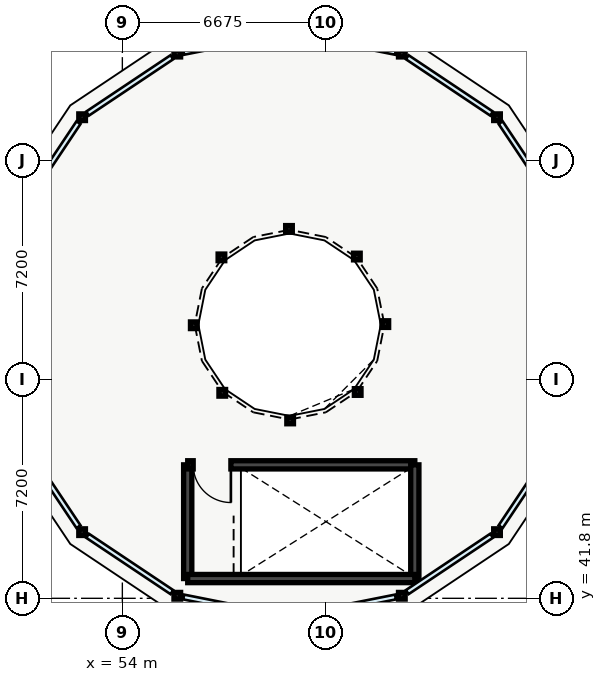
"""IFC4 building model, lengths in metres.
Left out: names, types, materials, properties, quantities, classifications, styles, units other than length and angle.
Written with IfcOpenShell. Run it as: python <this file> out.ifc"""

import sys

from ifc_helpers import new_model, si_unit, direction, frame, frame_2d, origin, origin_2d, place, context, subcontext, project, spatial, rectangle, hollow_circle, extrude, element, fill, save


model = new_model("IFC4")
c1 = context("Model", 3, precision=1e-05, world=origin(), true_north=direction((0.0, 1.0)))
c2 = subcontext(c1, "Body", "Model", "MODEL_VIEW")
j1 = project(units=[si_unit("LENGTHUNIT", "METRE"), si_unit("PLANEANGLEUNIT", "RADIAN")], contexts=[c1])
p1 = place(None, origin())
s1 = spatial("IfcSite", under=j1, at=p1, CompositionType="ELEMENT")
p2 = place(p1, origin())
s2 = spatial("IfcBuilding", under=s1, at=p2, CompositionType="ELEMENT")
p3 = place(p2, frame((0.0, 0.0, 5.1)))
s3 = spatial("IfcBuildingStorey", under=s2, at=p3, CompositionType="ELEMENT", Elevation=5.1)
for number, where, z_axis, x_axis in (
    (1, (66.323, 57.624, 0.0), (0.0, 0.0, 1.0), (1.0, 0.0, 0.0)),
    (2, (63.193, 59.715, 0.0), (0.0, 0.0, 1.0), (1.0, 0.0, 0.0)),
    (3, (55.807, 59.715, 0.0), (0.0, 0.0, 1.0), (1.0, 0.0, 0.0)),
    (4, (52.677, 57.624, 0.0), (0.0, 0.0, 1.0), (1.0, 0.0, 0.0)),
    (5, (52.677, 43.976, 0.0), (0.0, 0.0, 1.0), (1.0, 0.0, 0.0)),
    (6, (55.807, 41.885, 0.0), (0.0, 0.0, 1.0), (1.0, 0.0, 0.0)),
    (7, (63.193, 41.885, 0.0), (0.0, 0.0, 1.0), (1.0, 0.0, 0.0)),
    (8, (66.323, 43.976, 0.0), (0.0, 0.0, 1.0), (1.0, 0.0, 0.0)),
):
    element("IfcColumn", number, at=place(p3, frame(where, z_axis=z_axis, x_axis=x_axis)), inside=s3, PredefinedType="COLUMN", context=c2, shape_type="SweptSolid", body=[
        extrude(hollow_circle(Radius=0.11, WallThickness=0.01, at=origin_2d()), origin(), (0.0, 0.0, 1.0), 4.5),
    ])
for number, where, z_axis, x_axis in (
    (9, (62.65, 50.819, 0.0), (0.0, 0.0, 1.0), (1.0, 0.0, 0.0)),
    (10, (61.714, 53.041, 0.0), (0.0, 0.0, 1.0), (1.0, 0.0, 0.0)),
    (11, (59.481, 53.95, 0.0), (0.0, 0.0, 1.0), (1.0, 0.0, 0.0)),
    (12, (57.259, 53.014, 0.0), (0.0, 0.0, 1.0), (1.0, 0.0, 0.0)),
    (13, (56.35, 50.781, 0.0), (0.0, 0.0, 1.0), (1.0, 0.0, 0.0)),
    (14, (57.286, 48.559, 0.0), (0.0, 0.0, 1.0), (1.0, 0.0, 0.0)),
    (15, (59.519, 47.65, 0.0), (0.0, 0.0, 1.0), (1.0, 0.0, 0.0)),
    (16, (61.741, 48.586, 0.0), (0.0, 0.0, 1.0), (1.0, 0.0, 0.0)),
):
    element("IfcColumn", number, at=place(p3, frame(where, z_axis=z_axis, x_axis=x_axis)), inside=s3, PredefinedType="COLUMN", context=c2, shape_type="SweptSolid", body=[
        extrude(hollow_circle(Radius=0.11, WallThickness=0.01, at=origin_2d()), origin(), (0.0, 0.0, 1.0), 6.82),
    ])
p4 = place(p3, frame((56.15, 42.45, 0.0), z_axis=(0.0, 0.0, 1.0), x_axis=(0.0, 1.0, 0.0)))
e17 = element("IfcWall", 17, at=p4, inside=s3, PredefinedType="SHEAR", context=c2, shape_type="SweptSolid", body=[
    extrude(rectangle(XDim=3.74, YDim=0.27, at=frame_2d((1.87, 0.0))), origin(), (0.0, 0.0, 1.0), 4.3),
])
p5 = place(p3, frame((56.15, 46.19, 0.0), z_axis=(0.0, 0.0, 1.0), x_axis=(1.0, 0.0, 0.0)))
e18 = element("IfcWall", 18, at=p5, inside=s3, PredefinedType="SHEAR", context=c2, shape_type="SweptSolid", body=[
    extrude(rectangle(XDim=7.47, YDim=0.27, at=frame_2d((3.735, 0.0))), origin(), (0.0, 0.0, 1.0), 4.3),
])
p6 = place(p5, frame((0.18, 0.0, 0.0)))
e19 = element("IfcOpeningElement", 19, at=p6, cuts=e18, PredefinedType="OPENING", context=c2, shape_type="SweptSolid", body=[
    extrude(rectangle(XDim=1.24, YDim=2.15, at=frame_2d((0.62, 1.075))), frame((0.0, 0.135, 0.0), z_axis=(0.0, -1.0, 0.0), x_axis=(1.0, 0.0, 0.0)), (0.0, 0.0, 1.0), 0.27),
])
p7 = place(p3, frame((63.62, 46.19, 0.0), z_axis=(0.0, 0.0, 1.0), x_axis=(0.0, -1.0, 0.0)))
e20 = element("IfcWall", 20, at=p7, inside=s3, PredefinedType="SHEAR", context=c2, shape_type="SweptSolid", body=[
    extrude(rectangle(XDim=3.74, YDim=0.27, at=frame_2d((1.87, 0.0))), origin(), (0.0, 0.0, 1.0), 4.3),
])
p8 = place(p3, frame((63.62, 42.45, 0.0), z_axis=(0.0, 0.0, 1.0), x_axis=(-1.0, 0.0, 0.0)))
e21 = element("IfcWall", 21, at=p8, inside=s3, PredefinedType="SHEAR", context=c2, shape_type="SweptSolid", body=[
    extrude(rectangle(XDim=7.47, YDim=0.27, at=frame_2d((3.735, 0.0))), origin(), (0.0, 0.0, 1.0), 4.3),
])
p9 = place(p6, origin())
e22 = element("IfcDoor", 22, at=p9, inside=s3, OperationType="SINGLE_SWING_RIGHT", PredefinedType="DOOR", context=c2, shape_type="SweptSolid", body=[
    extrude(rectangle(XDim=1.24, YDim=2.15, at=frame_2d((0.62, 1.075))), frame((0.0, 0.025, 0.0), z_axis=(0.0, -1.0, 0.0), x_axis=(1.0, 0.0, 0.0)), (0.0, 0.0, 1.0), 0.05),
])
fill(e19, e22)
save(model, sys.argv[1])
